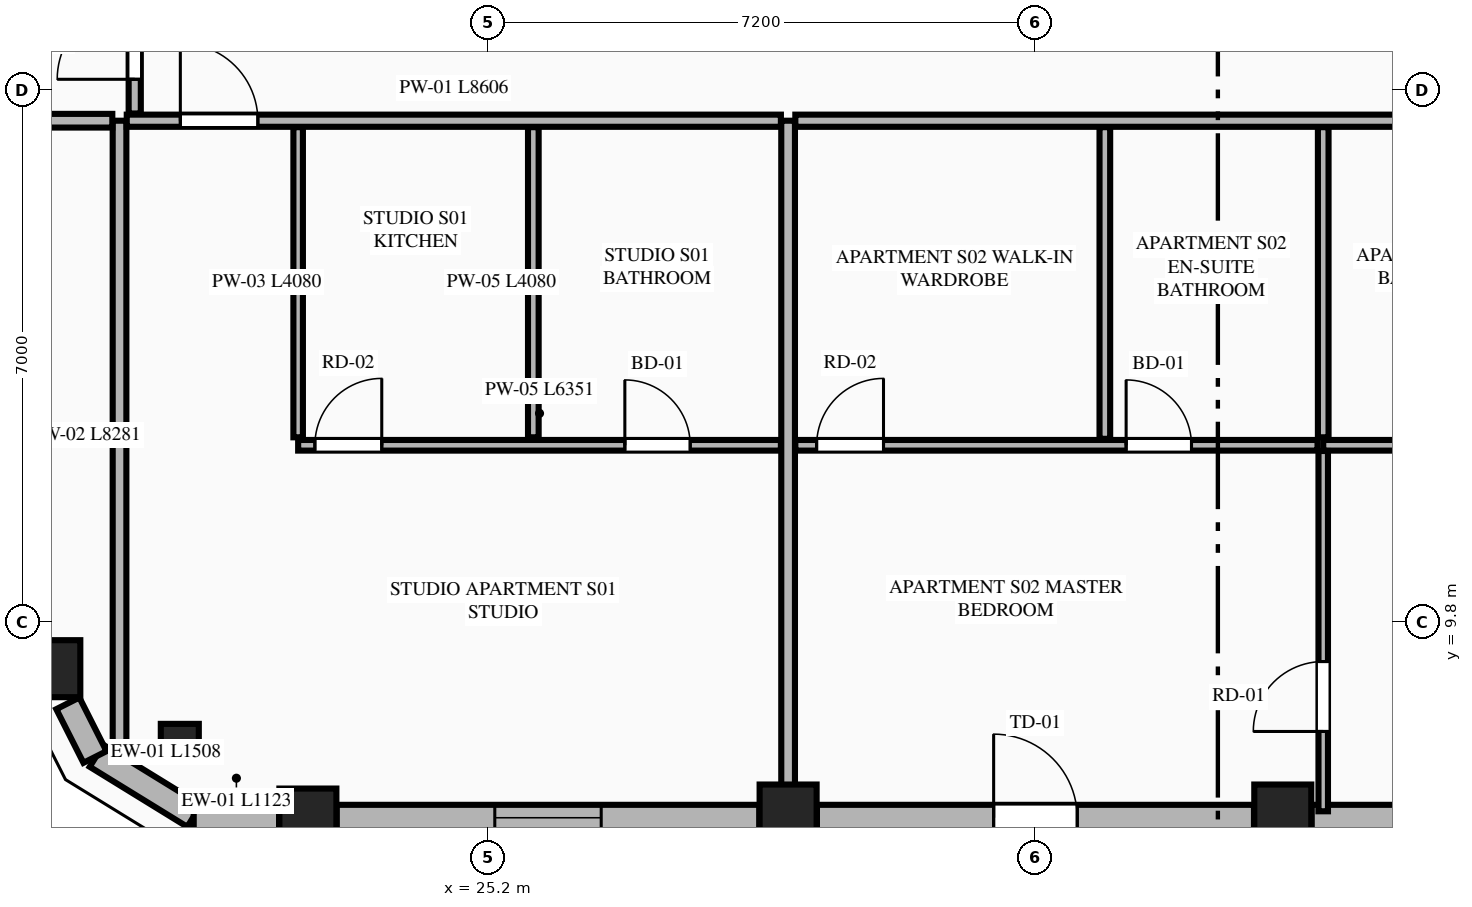
"""IFC4 building model, lengths in metres.
Left out: names, types, materials, properties, quantities, classifications, styles, units other than length and angle.
Written with IfcOpenShell. Run it as: python <this file> out.ifc"""

import sys

from ifc_helpers import new_model, si_unit, direction, frame, frame_2d, origin, origin_2d, place, context, subcontext, project, spatial, rectangle, extrude, element, fill, save


model = new_model("IFC4")
c1 = context("Model", 3, precision=1e-05, world=origin(), true_north=direction((0.0, 1.0)))
c2 = subcontext(c1, "Body", "Model", "MODEL_VIEW")
j1 = project(units=[si_unit("LENGTHUNIT", "METRE"), si_unit("PLANEANGLEUNIT", "RADIAN")], contexts=[c1])
p1 = place(None, origin())
s1 = spatial("IfcSite", under=j1, at=p1, CompositionType="ELEMENT")
p2 = place(p1, origin())
s2 = spatial("IfcBuilding", under=s1, at=p2, CompositionType="ELEMENT")
p3 = place(p2, frame((0.0, 0.0, 234.3)))
s3 = spatial("IfcBuildingStorey", under=s2, at=p3, CompositionType="ELEMENT", Elevation=234.3)
for number, where, z_axis, x_axis in (
    (1, (22.828, 7.239, 0.0), (0.0, 0.0, 1.0), (1.0, 0.0, 0.0)),
    (2, (29.146, 7.292, 0.0), (0.0, 0.0, 1.0), (1.0, 0.0, 0.0)),
    (3, (35.654, 7.292, 0.0), (0.0, 0.0, 1.0), (1.0, 0.0, 0.0)),
    (4, (19.459, 9.191, 0.0), (0.0, 0.0, 1.0), (1.0, 0.0, 0.0)),
):
    element("IfcColumn", number, at=place(p3, frame(where, z_axis=z_axis, x_axis=x_axis)), inside=s3, PredefinedType="COLUMN", context=c2, shape_type="SweptSolid", body=[
        extrude(rectangle(XDim=0.75, YDim=0.75, at=origin_2d()), origin(), (0.0, 0.0, 1.0), 3.65),
    ])
p4 = place(p3, frame((21.143, 8.215, 0.0), z_axis=(0.0, 0.0, 1.0), x_axis=(0.865256437757, -0.501329529272, 0.0)))
e5 = element("IfcColumn", 5, at=p4, inside=s3, PredefinedType="PILASTER", context=c2, shape_type="SweptSolid", body=[
    extrude(rectangle(XDim=0.5, YDim=0.35, at=origin_2d()), origin(), (0.0, 0.0, 1.0), 3.65),
])
p5 = place(p3, frame((20.047, 8.045, 0.0), z_axis=(0.0, 0.0, 1.0), x_axis=(0.851680557619, -0.52406128246, 0.0)))
e6 = element("IfcWall", 6, at=p5, inside=s3, PredefinedType="STANDARD", context=c2, shape_type="SweptSolid", body=[
    extrude(rectangle(XDim=1.508, YDim=0.34, at=frame_2d((0.754, 0.0))), origin(), (0.0, 0.0, 1.0), 3.45),
])
p6 = place(p3, frame((21.326, 7.23, 0.0), z_axis=(0.0, 0.0, 1.0), x_axis=(1.0, 0.0, 0.0)))
e7 = element("IfcWall", 7, at=p6, inside=s3, PredefinedType="STANDARD", context=c2, shape_type="SweptSolid", body=[
    extrude(rectangle(XDim=1.123, YDim=0.34, at=frame_2d((0.562, 0.0))), origin(), (0.0, 0.0, 1.0), 3.45),
])
p7 = place(p3, frame((23.207, 7.23, 0.0), z_axis=(0.0, 0.0, 1.0), x_axis=(1.0, 0.0, 0.0)))
e8 = element("IfcWall", 8, at=p7, inside=s3, PredefinedType="STANDARD", context=c2, shape_type="SweptSolid", body=[
    extrude(rectangle(XDim=5.56, YDim=0.34, at=frame_2d((2.78, 0.0))), origin(), (0.0, 0.0, 1.0), 2.983),
])
p8 = place(p7, frame((2.08, 0.0, 0.75)))
e9 = element("IfcOpeningElement", 9, at=p8, cuts=e8, PredefinedType="OPENING", context=c2, shape_type="SweptSolid", body=[
    extrude(rectangle(XDim=1.4, YDim=2.05, at=frame_2d((0.7, 1.025))), frame((0.0, 0.18, 0.0), z_axis=(0.0, -1.0, 0.0), x_axis=(1.0, 0.0, 0.0)), (0.0, 0.0, 1.0), 0.36),
])
p9 = place(p3, frame((29.525, 7.23, 0.0), z_axis=(0.0, 0.0, 1.0), x_axis=(1.0, 0.0, 0.0)))
e10 = element("IfcWall", 10, at=p9, inside=s3, PredefinedType="STANDARD", context=c2, shape_type="SweptSolid", body=[
    extrude(rectangle(XDim=5.75, YDim=0.34, at=frame_2d((2.875, 0.0))), origin(), (0.0, 0.0, 1.0), 2.983),
])
p10 = place(p9, frame((2.325, 0.0, 0.0)))
e11 = element("IfcOpeningElement", 11, at=p10, cuts=e10, PredefinedType="OPENING", context=c2, shape_type="SweptSolid", body=[
    extrude(rectangle(XDim=1.1, YDim=2.25, at=frame_2d((0.55, 1.125))), frame((0.0, 0.18, 0.0), z_axis=(0.0, -1.0, 0.0), x_axis=(1.0, 0.0, 0.0)), (0.0, 0.0, 1.0), 0.36),
])
p11 = place(p3, frame((36.033, 7.23, 0.0), z_axis=(0.0, 0.0, 1.0), x_axis=(1.0, 0.0, 0.0)))
e12 = element("IfcWall", 12, at=p11, inside=s3, PredefinedType="STANDARD", context=c2, shape_type="SweptSolid", body=[
    extrude(rectangle(XDim=5.56, YDim=0.34, at=frame_2d((2.78, 0.0))), origin(), (0.0, 0.0, 1.0), 2.983),
])
p12 = place(p11, frame((2.23, 0.0, 0.75)))
e13 = element("IfcOpeningElement", 13, at=p12, cuts=e12, PredefinedType="OPENING", context=c2, shape_type="SweptSolid", body=[
    extrude(rectangle(XDim=1.1, YDim=2.0, at=frame_2d((0.55, 1.0))), frame((0.0, 0.18, 0.0), z_axis=(0.0, -1.0, 0.0), x_axis=(1.0, 0.0, 0.0)), (0.0, 0.0, 1.0), 0.36),
])
p13 = place(p3, frame((19.67, 8.735, 0.0), z_axis=(0.0, 0.0, 1.0), x_axis=(0.451404919072, -0.89231922485, 0.0)))
e14 = element("IfcWall", 14, at=p13, inside=s3, PredefinedType="STANDARD", context=c2, shape_type="SweptSolid", body=[
    extrude(rectangle(XDim=0.791, YDim=0.34, at=frame_2d((0.396, 0.0))), origin(), (0.0, 0.0, 1.0), 3.45),
])
p14 = place(p3, frame((20.35, 8.119, 0.0), z_axis=(0.0, 0.0, 1.0), x_axis=(0.0, 1.0, 0.0)))
e15 = element("IfcWall", 15, at=p14, inside=s3, PredefinedType="PARTITIONING", context=c2, shape_type="SweptSolid", body=[
    extrude(rectangle(XDim=8.281, YDim=0.18, at=frame_2d((4.141, 0.0))), origin(), (0.0, 0.0, 1.0), 3.45),
])
p15 = place(p3, frame((29.146, 7.405, 0.0), z_axis=(0.0, 0.0, 1.0), x_axis=(0.0, 1.0, 0.0)))
e16 = element("IfcWall", 16, at=p15, inside=s3, PredefinedType="PARTITIONING", context=c2, shape_type="SweptSolid", body=[
    extrude(rectangle(XDim=8.995, YDim=0.18, at=frame_2d((4.498, 0.0))), origin(), (0.0, 0.0, 1.0), 2.907),
])
p16 = place(p3, frame((20.445, 16.4, 0.0), z_axis=(0.0, 0.0, 1.0), x_axis=(1.0, 0.0, 0.0)))
e17 = element("IfcWall", 17, at=p16, inside=s3, PredefinedType="PARTITIONING", context=c2, shape_type="SweptSolid", body=[
    extrude(rectangle(XDim=8.606, YDim=0.16, at=frame_2d((4.303, 0.0))), origin(), (0.0, 0.0, 1.0), 3.45),
])
p17 = place(p16, frame((0.705, 0.0, 0.0)))
e18 = element("IfcOpeningElement", 18, at=p17, cuts=e17, PredefinedType="OPENING", context=c2, shape_type="SweptSolid", body=[
    extrude(rectangle(XDim=1.02, YDim=2.25, at=frame_2d((0.51, 1.125))), frame((0.0, 0.09, 0.0), z_axis=(0.0, -1.0, 0.0), x_axis=(1.0, 0.0, 0.0)), (0.0, 0.0, 1.0), 0.18),
])
p18 = place(p3, frame((22.7, 12.235, 0.0), z_axis=(0.0, 0.0, 1.0), x_axis=(0.0, 1.0, 0.0)))
e19 = element("IfcWall", 19, at=p18, inside=s3, PredefinedType="PARTITIONING", context=c2, shape_type="SweptSolid", body=[
    extrude(rectangle(XDim=4.08, YDim=0.125, at=frame_2d((2.04, 0.0))), origin(), (0.0, 0.0, 1.0), 2.907),
])
p19 = place(p3, frame((22.7, 12.13, 0.0), z_axis=(0.0, 0.0, 1.0), x_axis=(1.0, 0.0, 0.0)))
e20 = element("IfcWall", 20, at=p19, inside=s3, PredefinedType="PLUMBINGWALL", context=c2, shape_type="SweptSolid", body=[
    extrude(rectangle(XDim=6.351, YDim=0.14, at=frame_2d((3.176, 0.0))), origin(), (0.0, 0.0, 1.0), 3.45),
])
p20 = place(p19, frame((4.298, 0.0, 0.0)))
e21 = element("IfcOpeningElement", 21, at=p20, cuts=e20, PredefinedType="OPENING", context=c2, shape_type="SweptSolid", body=[
    extrude(rectangle(XDim=0.86, YDim=2.1, at=frame_2d((0.43, 1.05))), frame((0.0, 0.08, 0.0), z_axis=(0.0, -1.0, 0.0), x_axis=(1.0, 0.0, 0.0)), (0.0, 0.0, 1.0), 0.16),
])
p21 = place(p19, frame((0.22, 0.0, 0.0)))
e22 = element("IfcOpeningElement", 22, at=p21, cuts=e20, PredefinedType="OPENING", context=c2, shape_type="SweptSolid", body=[
    extrude(rectangle(XDim=0.88, YDim=2.15, at=frame_2d((0.44, 1.075))), frame((0.0, 0.08, 0.0), z_axis=(0.0, -1.0, 0.0), x_axis=(1.0, 0.0, 0.0)), (0.0, 0.0, 1.0), 0.16),
])
p22 = place(p3, frame((25.794, 12.235, 0.0), z_axis=(0.0, 0.0, 1.0), x_axis=(0.0, 1.0, 0.0)))
e23 = element("IfcWall", 23, at=p22, inside=s3, PredefinedType="PLUMBINGWALL", context=c2, shape_type="SweptSolid", body=[
    extrude(rectangle(XDim=4.08, YDim=0.14, at=frame_2d((2.04, 0.0))), origin(), (0.0, 0.0, 1.0), 3.45),
])
p23 = place(p3, frame((29.241, 16.4, 0.0), z_axis=(0.0, 0.0, 1.0), x_axis=(1.0, 0.0, 0.0)))
e24 = element("IfcWall", 24, at=p23, inside=s3, PredefinedType="PARTITIONING", context=c2, shape_type="SweptSolid", body=[
    extrude(rectangle(XDim=15.114, YDim=0.16, at=frame_2d((7.557, 0.0))), origin(), (0.0, 0.0, 1.0), 3.45),
])
p24 = place(p23, frame((12.909, 0.0, 0.0)))
e25 = element("IfcOpeningElement", 25, at=p24, cuts=e24, PredefinedType="OPENING", context=c2, shape_type="SweptSolid", body=[
    extrude(rectangle(XDim=1.02, YDim=2.25, at=frame_2d((0.51, 1.125))), frame((0.0, 0.09, 0.0), z_axis=(0.0, -1.0, 0.0), x_axis=(1.0, 0.0, 0.0)), (0.0, 0.0, 1.0), 0.18),
])
p25 = place(p3, frame((36.186, 12.13, 0.0), z_axis=(0.0, 0.0, 1.0), x_axis=(1.0, 0.0, 0.0)))
e26 = element("IfcWall", 26, at=p25, inside=s3, PredefinedType="PLUMBINGWALL", context=c2, shape_type="SweptSolid", body=[
    extrude(rectangle(XDim=5.714, YDim=0.14, at=frame_2d((2.857, 0.0))), origin(), (0.0, 0.0, 1.0), 3.45),
])
p26 = place(p25, frame((1.003, 0.0, 0.0)))
e27 = element("IfcOpeningElement", 27, at=p26, cuts=e26, PredefinedType="OPENING", context=c2, shape_type="SweptSolid", body=[
    extrude(rectangle(XDim=0.86, YDim=2.1, at=frame_2d((0.43, 1.05))), frame((0.0, 0.08, 0.0), z_axis=(0.0, -1.0, 0.0), x_axis=(1.0, 0.0, 0.0)), (0.0, 0.0, 1.0), 0.16),
])
p27 = place(p25, frame((3.057, 0.0, 0.0)))
e28 = element("IfcOpeningElement", 28, at=p27, cuts=e26, PredefinedType="OPENING", context=c2, shape_type="SweptSolid", body=[
    extrude(rectangle(XDim=0.88, YDim=2.15, at=frame_2d((0.44, 1.075))), frame((0.0, 0.08, 0.0), z_axis=(0.0, -1.0, 0.0), x_axis=(1.0, 0.0, 0.0)), (0.0, 0.0, 1.0), 0.16),
])
p28 = place(p3, frame((29.241, 12.13, 0.0), z_axis=(0.0, 0.0, 1.0), x_axis=(1.0, 0.0, 0.0)))
e29 = element("IfcWall", 29, at=p28, inside=s3, PredefinedType="PLUMBINGWALL", context=c2, shape_type="SweptSolid", body=[
    extrude(rectangle(XDim=6.87, YDim=0.14, at=frame_2d((3.435, 0.0))), origin(), (0.0, 0.0, 1.0), 3.45),
])
p29 = place(p28, frame((0.28, 0.0, 0.0)))
e30 = element("IfcOpeningElement", 30, at=p29, cuts=e29, PredefinedType="OPENING", context=c2, shape_type="SweptSolid", body=[
    extrude(rectangle(XDim=0.88, YDim=2.15, at=frame_2d((0.44, 1.075))), frame((0.0, 0.08, 0.0), z_axis=(0.0, -1.0, 0.0), x_axis=(1.0, 0.0, 0.0)), (0.0, 0.0, 1.0), 0.16),
])
p30 = place(p28, frame((4.352, 0.0, 0.0)))
e31 = element("IfcOpeningElement", 31, at=p30, cuts=e29, PredefinedType="OPENING", context=c2, shape_type="SweptSolid", body=[
    extrude(rectangle(XDim=0.86, YDim=2.1, at=frame_2d((0.43, 1.05))), frame((0.0, 0.08, 0.0), z_axis=(0.0, -1.0, 0.0), x_axis=(1.0, 0.0, 0.0)), (0.0, 0.0, 1.0), 0.16),
])
p31 = place(p3, frame((36.186, 12.235, 0.0), z_axis=(0.0, 0.0, 1.0), x_axis=(0.0, 1.0, 0.0)))
e32 = element("IfcWall", 32, at=p31, inside=s3, PredefinedType="PLUMBINGWALL", context=c2, shape_type="SweptSolid", body=[
    extrude(rectangle(XDim=4.08, YDim=0.14, at=frame_2d((2.04, 0.0))), origin(), (0.0, 0.0, 1.0), 3.45),
])
p32 = place(p3, frame((36.186, 7.315, 0.0), z_axis=(0.0, 0.0, 1.0), x_axis=(0.0, 1.0, 0.0)))
e33 = element("IfcWall", 33, at=p32, inside=s3, PredefinedType="PARTITIONING", context=c2, shape_type="SweptSolid", body=[
    extrude(rectangle(XDim=4.74, YDim=0.125, at=frame_2d((2.37, 0.0))), origin(), (0.0, 0.0, 1.0), 3.45),
])
p33 = place(p32, frame((1.05, 0.0, 0.0)))
e34 = element("IfcOpeningElement", 34, at=p33, cuts=e33, PredefinedType="OPENING", context=c2, shape_type="SweptSolid", body=[
    extrude(rectangle(XDim=0.92, YDim=2.15, at=frame_2d((0.46, 1.075))), frame((0.0, 0.073, 0.0), z_axis=(0.0, -1.0, 0.0), x_axis=(1.0, 0.0, 0.0)), (0.0, 0.0, 1.0), 0.145),
])
p34 = place(p3, frame((33.313, 12.215, 0.0), z_axis=(0.0, 0.0, 1.0), x_axis=(0.0, 1.0, 0.0)))
e35 = element("IfcWall", 35, at=p34, inside=s3, PredefinedType="PLUMBINGWALL", context=c2, shape_type="SweptSolid", body=[
    extrude(rectangle(XDim=4.1, YDim=0.14, at=frame_2d((2.05, 0.0))), origin(), (0.0, 0.0, 1.0), 3.45),
])
p35 = place(p3, frame((16.034, 16.4, 0.0), z_axis=(0.0, 0.0, 1.0), x_axis=(1.0, 0.0, 0.0)))
e36 = element("IfcWall", 36, at=p35, inside=s3, PredefinedType="PARTITIONING", context=c2, shape_type="SweptSolid", body=[
    extrude(rectangle(XDim=4.221, YDim=0.18, at=frame_2d((2.11, 0.0))), origin(), (0.0, 0.0, 1.0), 3.45),
])
p36 = place(p3, frame((20.55, 16.495, 0.0), z_axis=(0.0, 0.0, 1.0), x_axis=(0.0, 1.0, 0.0)))
e37 = element("IfcWall", 37, at=p36, inside=s3, PredefinedType="PARTITIONING", context=c2, shape_type="SweptSolid", body=[
    extrude(rectangle(XDim=18.41, YDim=0.16, at=frame_2d((9.205, 0.0))), origin(), (0.0, 0.0, 1.0), 3.137),
])
p37 = place(p36, frame((0.45, 0.0, 0.0)))
e38 = element("IfcOpeningElement", 38, at=p37, cuts=e37, PredefinedType="OPENING", context=c2, shape_type="SweptSolid", body=[
    extrude(rectangle(XDim=1.02, YDim=2.25, at=frame_2d((0.51, 1.125))), frame((0.0, 0.09, 0.0), z_axis=(0.0, -1.0, 0.0), x_axis=(1.0, 0.0, 0.0)), (0.0, 0.0, 1.0), 0.18),
])
p38 = place(p8, origin())
e39 = element("IfcWindow", 39, at=p38, inside=s3, PartitioningType="SINGLE_PANEL", PredefinedType="WINDOW", context=c2, shape_type="SweptSolid", body=[
    extrude(rectangle(XDim=1.4, YDim=2.05, at=frame_2d((0.7, 1.025))), frame((0.0, 0.03, 0.0), z_axis=(0.0, -1.0, 0.0), x_axis=(1.0, 0.0, 0.0)), (0.0, 0.0, 1.0), 0.06),
])
fill(e9, e39)
p39 = place(p10, origin())
e40 = element("IfcDoor", 40, at=p39, inside=s3, OperationType="SINGLE_SWING_LEFT", PredefinedType="DOOR", context=c2, shape_type="SweptSolid", body=[
    extrude(rectangle(XDim=1.1, YDim=2.25, at=frame_2d((0.55, 1.125))), frame((0.0, 0.025, 0.0), z_axis=(0.0, -1.0, 0.0), x_axis=(1.0, 0.0, 0.0)), (0.0, 0.0, 1.0), 0.05),
])
fill(e11, e40)
p40 = place(p20, origin())
e41 = element("IfcDoor", 41, at=p40, inside=s3, OperationType="SINGLE_SWING_LEFT", PredefinedType="DOOR", context=c2, shape_type="SweptSolid", body=[
    extrude(rectangle(XDim=0.86, YDim=2.1, at=frame_2d((0.43, 1.05))), frame((0.0, 0.025, 0.0), z_axis=(0.0, -1.0, 0.0), x_axis=(1.0, 0.0, 0.0)), (0.0, 0.0, 1.0), 0.05),
])
fill(e21, e41)
p41 = place(p17, origin())
e42 = element("IfcDoor", 42, at=p41, inside=s3, OperationType="SINGLE_SWING_LEFT", PredefinedType="DOOR", context=c2, shape_type="SweptSolid", body=[
    extrude(rectangle(XDim=1.02, YDim=2.25, at=frame_2d((0.51, 1.125))), frame((0.0, 0.025, 0.0), z_axis=(0.0, -1.0, 0.0), x_axis=(1.0, 0.0, 0.0)), (0.0, 0.0, 1.0), 0.05),
])
fill(e18, e42)
p42 = place(p21, origin())
e43 = element("IfcDoor", 43, at=p42, inside=s3, OperationType="SINGLE_SWING_RIGHT", PredefinedType="DOOR", context=c2, shape_type="SweptSolid", body=[
    extrude(rectangle(XDim=0.88, YDim=2.15, at=frame_2d((0.44, 1.075))), frame((0.0, 0.025, 0.0), z_axis=(0.0, -1.0, 0.0), x_axis=(1.0, 0.0, 0.0)), (0.0, 0.0, 1.0), 0.05),
])
fill(e22, e43)
p43 = place(p29, origin())
e44 = element("IfcDoor", 44, at=p43, inside=s3, OperationType="SINGLE_SWING_RIGHT", PredefinedType="DOOR", context=c2, shape_type="SweptSolid", body=[
    extrude(rectangle(XDim=0.88, YDim=2.15, at=frame_2d((0.44, 1.075))), frame((0.0, 0.025, 0.0), z_axis=(0.0, -1.0, 0.0), x_axis=(1.0, 0.0, 0.0)), (0.0, 0.0, 1.0), 0.05),
])
fill(e30, e44)
p44 = place(p30, origin())
e45 = element("IfcDoor", 45, at=p44, inside=s3, OperationType="SINGLE_SWING_LEFT", PredefinedType="DOOR", context=c2, shape_type="SweptSolid", body=[
    extrude(rectangle(XDim=0.86, YDim=2.1, at=frame_2d((0.43, 1.05))), frame((0.0, 0.025, 0.0), z_axis=(0.0, -1.0, 0.0), x_axis=(1.0, 0.0, 0.0)), (0.0, 0.0, 1.0), 0.05),
])
fill(e31, e45)
p45 = place(p33, origin())
e46 = element("IfcDoor", 46, at=p45, inside=s3, OperationType="SINGLE_SWING_LEFT", PredefinedType="DOOR", context=c2, shape_type="SweptSolid", body=[
    extrude(rectangle(XDim=0.92, YDim=2.15, at=frame_2d((0.46, 1.075))), frame((0.0, 0.025, 0.0), z_axis=(0.0, -1.0, 0.0), x_axis=(1.0, 0.0, 0.0)), (0.0, 0.0, 1.0), 0.05),
])
fill(e34, e46)
p46 = place(p37, origin())
e47 = element("IfcDoor", 47, at=p46, inside=s3, OperationType="SINGLE_SWING_LEFT", PredefinedType="DOOR", context=c2, shape_type="SweptSolid", body=[
    extrude(rectangle(XDim=1.02, YDim=2.25, at=frame_2d((0.51, 1.125))), frame((0.0, 0.025, 0.0), z_axis=(0.0, -1.0, 0.0), x_axis=(1.0, 0.0, 0.0)), (0.0, 0.0, 1.0), 0.05),
])
fill(e38, e47)
save(model, sys.argv[1])
